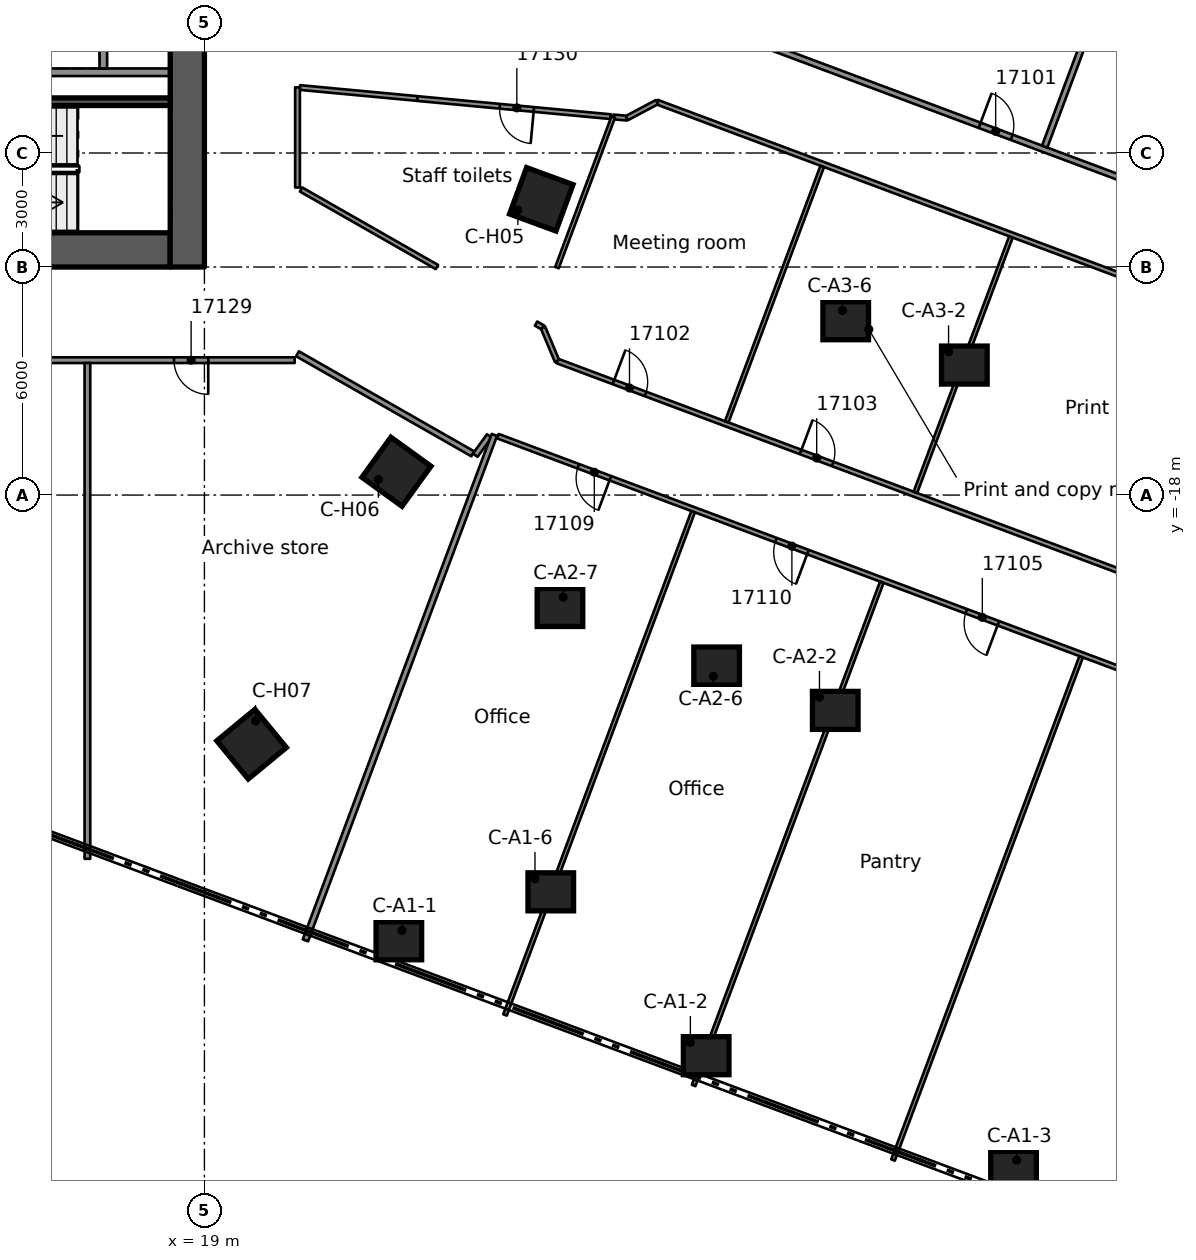
"""IFC4 building model, lengths in metres.
Left out: names, types, materials, properties, quantities, classifications, styles, units other than length and angle.
Written with IfcOpenShell. Run it as: python <this file> out.ifc"""

import sys

from ifc_helpers import new_model, si_unit, direction, frame, frame_2d, origin, origin_2d, place, context, subcontext, project, spatial, rectangle, extrude, element, fill, save


model = new_model("IFC4")
c1 = context("Model", 3, precision=1e-05, world=origin(), true_north=direction((0.0, 1.0)))
c2 = subcontext(c1, "Body", "Model", "MODEL_VIEW")
j1 = project(units=[si_unit("LENGTHUNIT", "METRE"), si_unit("PLANEANGLEUNIT", "RADIAN")], contexts=[c1])
p1 = place(None, origin())
s1 = spatial("IfcSite", under=j1, at=p1, CompositionType="ELEMENT")
p2 = place(p1, origin())
s2 = spatial("IfcBuilding", under=s1, at=p2, CompositionType="ELEMENT")
p3 = place(p2, frame((0.0, 0.0, 84.2)))
s3 = spatial("IfcBuildingStorey", under=s2, at=p3, CompositionType="ELEMENT", Elevation=84.2)
p4 = place(p3, frame((8.9, -11.55, 0.0), z_axis=(0.0, 0.0, 1.0), x_axis=(1.0, 0.0, 0.0)))
e1 = element("IfcWall", 1, at=p4, inside=s3, PredefinedType="SHEAR", context=c2, shape_type="SweptSolid", body=[
    extrude(rectangle(XDim=9.2, YDim=0.9, at=frame_2d((4.6, 0.0))), origin(), (0.0, 0.0, 1.0), 3.5),
])
p5 = place(p4, frame((3.0, 0.0, 0.0)))
e2 = element("IfcOpeningElement", 2, at=p5, cuts=e1, PredefinedType="OPENING", context=c2, shape_type="SweptSolid", body=[
    extrude(rectangle(XDim=1.1, YDim=2.1, at=frame_2d((0.55, 1.05))), frame((0.0, 0.46, 0.0), z_axis=(0.0, -1.0, 0.0), x_axis=(1.0, 0.0, 0.0)), (0.0, 0.0, 1.0), 0.92),
])
p6 = place(p3, frame((18.55, -12.0, 0.0), z_axis=(0.0, 0.0, 1.0), x_axis=(0.0, 1.0, 0.0)))
e3 = element("IfcWall", 3, at=p6, inside=s3, PredefinedType="SHEAR", context=c2, shape_type="SweptSolid", body=[
    extrude(rectangle(XDim=24.0, YDim=0.9, at=frame_2d((12.0, 0.0))), origin(), (0.0, 0.0, 1.0), 3.5),
])
p7 = place(p6, frame((12.1, 0.0, 0.0)))
e4 = element("IfcOpeningElement", 4, at=p7, cuts=e3, PredefinedType="OPENING", context=c2, shape_type="SweptSolid", body=[
    extrude(rectangle(XDim=1.8, YDim=2.1, at=frame_2d((0.9, 1.05))), frame((0.0, 0.46, 0.0), z_axis=(0.0, -1.0, 0.0), x_axis=(1.0, 0.0, 0.0)), (0.0, 0.0, 1.0), 0.92),
])
for number, where, z_axis, x_axis in (
    (5, (24.116, -29.728, 0.0), (0.0, 0.0, 1.0), (1.0, 0.0, 0.0)),
    (6, (32.203, -32.752, 0.0), (0.0, 0.0, 1.0), (1.0, 0.0, 0.0)),
    (7, (40.291, -35.771, 0.0), (0.0, 0.0, 1.0), (1.0, 0.0, 0.0)),
    (8, (28.114, -28.44, 0.0), (0.0, 0.0, 1.0), (1.0, 0.0, 0.0)),
    (9, (35.6, -23.666, 0.0), (0.0, 0.0, 1.0), (1.0, 0.0, 0.0)),
    (10, (32.478, -22.499, 0.0), (0.0, 0.0, 1.0), (1.0, 0.0, 0.0)),
    (11, (28.356, -20.958, 0.0), (0.0, 0.0, 1.0), (1.0, 0.0, 0.0)),
    (12, (38.997, -14.58, 0.0), (0.0, 0.0, 1.0), (1.0, 0.0, 0.0)),
    (13, (35.875, -13.413, 0.0), (0.0, 0.0, 1.0), (1.0, 0.0, 0.0)),
):
    element("IfcColumn", number, at=place(p3, frame(where, z_axis=z_axis, x_axis=x_axis)), inside=s3, PredefinedType="COLUMN", context=c2, shape_type="SweptSolid", body=[
        extrude(rectangle(XDim=1.2, YDim=1.0, at=origin_2d()), origin(), (0.0, 0.0, 1.0), 3.5),
    ])
for number, where, z_axis, x_axis in (
    (14, (27.864, -10.218, 0.0), (0.0, 0.0, 1.0), (0.939, -0.344, 0.0)),
    (15, (24.053, -17.387, 0.0), (0.0, 0.0, 1.0), (0.81, -0.586, 0.0)),
    (16, (20.241, -24.555, 0.0), (0.0, 0.0, 1.0), (0.636, -0.772, 0.0)),
):
    element("IfcColumn", number, at=place(p3, frame(where, z_axis=z_axis, x_axis=x_axis)), inside=s3, PredefinedType="COLUMN", context=c2, shape_type="SweptSolid", body=[
        extrude(rectangle(XDim=1.3, YDim=1.3, at=origin_2d()), origin(), (0.0, 0.0, 1.0), 3.5),
    ])
p8 = place(p3, frame((11.54, -6.875, 0.0), z_axis=(0.0, 0.0, 1.0), x_axis=(1.0, 0.0, 0.0)))
e17 = element("IfcWall", 17, at=p8, inside=s3, PredefinedType="SOLIDWALL", context=c2, shape_type="SweptSolid", body=[
    extrude(rectangle(XDim=6.56, YDim=0.2, at=frame_2d((3.28, 0.0))), origin(), (0.0, 0.0, 1.0), 3.09),
])
p9 = place(p3, frame((16.34, -4.025, 0.0), z_axis=(0.0, 0.0, 1.0), x_axis=(0.0, -1.0, 0.0)))
e18 = element("IfcWall", 18, at=p9, inside=s3, PredefinedType="SOLIDWALL", context=c2, shape_type="SweptSolid", body=[
    extrude(rectangle(XDim=2.75, YDim=0.2, at=frame_2d((1.375, 0.0))), origin(), (0.0, 0.0, 1.0), 3.09),
])
p10 = place(p9, frame((0.925, 0.0, 0.0)))
e19 = element("IfcOpeningElement", 19, at=p10, cuts=e18, PredefinedType="OPENING", context=c2, shape_type="SweptSolid", body=[
    extrude(rectangle(XDim=1.1, YDim=2.1, at=frame_2d((0.55, 1.05))), frame((0.0, 0.11, 0.0), z_axis=(0.0, -1.0, 0.0), x_axis=(1.0, 0.0, 0.0)), (0.0, 0.0, 1.0), 0.22),
])
p11 = place(p3, frame((11.54, -7.65, 0.0), z_axis=(0.0, 0.0, 1.0), x_axis=(1.0, 0.0, 0.0)))
e20 = element("IfcWall", 20, at=p11, inside=s3, PredefinedType="SOLIDWALL", context=c2, shape_type="SweptSolid", body=[
    extrude(rectangle(XDim=6.56, YDim=0.2, at=frame_2d((3.28, 0.0))), origin(), (0.0, 0.0, 1.0), 3.09),
])
p12 = place(p3, frame((21.45, -14.283, 0.0), z_axis=(0.0, 0.0, 1.0), x_axis=(0.868472254755, -0.495737776169, 0.0)))
e21 = element("IfcWall", 21, at=p12, inside=s3, PredefinedType="PARTITIONING", context=c2, shape_type="SweptSolid", body=[
    extrude(rectangle(XDim=5.309, YDim=0.15, at=frame_2d((2.655, 0.0))), origin(), (0.0, 0.0, 1.0), 3.08),
])
p13 = place(p3, frame((27.726, -13.488, 0.0), z_axis=(0.0, 0.0, 1.0), x_axis=(0.867243838512, -0.497883645608, 0.0)))
e22 = element("IfcWall", 22, at=p13, inside=s3, PredefinedType="PARTITIONING", context=c2, shape_type="SweptSolid", body=[
    extrude(rectangle(XDim=0.211, YDim=0.125, at=frame_2d((0.105, 0.0))), origin(), (0.0, 0.0, 1.0), 3.08),
])
p14 = place(p3, frame((21.543, -9.96, 0.0), z_axis=(0.0, 0.0, 1.0), x_axis=(0.868534999161, -0.495627839445, 0.0)))
e23 = element("IfcWall", 23, at=p14, inside=s3, PredefinedType="PARTITIONING", context=c2, shape_type="SweptSolid", body=[
    extrude(rectangle(XDim=4.116, YDim=0.125, at=frame_2d((2.058, 0.0))), origin(), (0.0, 0.0, 1.0), 3.08),
])
p15 = place(p3, frame((49.587, -24.999, 0.0), z_axis=(0.0, 0.0, 1.0), x_axis=(-0.936679277277, 0.350188422882, 0.0)))
e24 = element("IfcWall", 24, at=p15, inside=s3, PredefinedType="PARTITIONING", context=c2, shape_type="SweptSolid", body=[
    extrude(rectangle(XDim=24.413, YDim=0.125, at=frame_2d((12.207, 0.0))), origin(), (0.0, 0.0, 1.0), 3.08),
])
p16 = place(p15, frame((10.351, 0.0, 0.0)))
e25 = element("IfcOpeningElement", 25, at=p16, cuts=e24, PredefinedType="OPENING", context=c2, shape_type="SweptSolid", body=[
    extrude(rectangle(XDim=0.9, YDim=2.1, at=frame_2d((0.45, 1.05))), frame((0.0, 0.073, 0.0), z_axis=(0.0, -1.0, 0.0), x_axis=(1.0, 0.0, 0.0)), (0.0, 0.0, 1.0), 0.145),
])
p17 = place(p15, frame((4.752, 0.0, 0.0)))
e26 = element("IfcOpeningElement", 26, at=p17, cuts=e24, PredefinedType="OPENING", context=c2, shape_type="SweptSolid", body=[
    extrude(rectangle(XDim=0.9, YDim=2.1, at=frame_2d((0.45, 1.05))), frame((0.0, 0.073, 0.0), z_axis=(0.0, -1.0, 0.0), x_axis=(1.0, 0.0, 0.0)), (0.0, 0.0, 1.0), 0.145),
])
p18 = place(p15, frame((21.251, 0.0, 0.0)))
e27 = element("IfcOpeningElement", 27, at=p18, cuts=e24, PredefinedType="OPENING", context=c2, shape_type="SweptSolid", body=[
    extrude(rectangle(XDim=0.9, YDim=2.1, at=frame_2d((0.45, 1.05))), frame((0.0, 0.073, 0.0), z_axis=(0.0, -1.0, 0.0), x_axis=(1.0, 0.0, 0.0)), (0.0, 0.0, 1.0), 0.145),
])
p19 = place(p15, frame((15.701, 0.0, 0.0)))
e28 = element("IfcOpeningElement", 28, at=p19, cuts=e24, PredefinedType="OPENING", context=c2, shape_type="SweptSolid", body=[
    extrude(rectangle(XDim=0.9, YDim=2.1, at=frame_2d((0.45, 1.05))), frame((0.0, 0.073, 0.0), z_axis=(0.0, -1.0, 0.0), x_axis=(1.0, 0.0, 0.0)), (0.0, 0.0, 1.0), 0.145),
])
p20 = place(p3, frame((28.277, -14.469, 0.0), z_axis=(0.0, 0.0, 1.0), x_axis=(0.936688160915, -0.350164660128, 0.0)))
e29 = element("IfcWall", 29, at=p20, inside=s3, PredefinedType="PARTITIONING", context=c2, shape_type="SweptSolid", body=[
    extrude(rectangle(XDim=21.184, YDim=0.125, at=frame_2d((10.592, 0.0))), origin(), (0.0, 0.0, 1.0), 3.08),
])
p21 = place(p20, frame((1.587, 0.0, 0.0)))
e30 = element("IfcOpeningElement", 30, at=p21, cuts=e29, PredefinedType="OPENING", context=c2, shape_type="SweptSolid", body=[
    extrude(rectangle(XDim=0.9, YDim=2.1, at=frame_2d((0.45, 1.05))), frame((0.0, 0.073, 0.0), z_axis=(0.0, -1.0, 0.0), x_axis=(1.0, 0.0, 0.0)), (0.0, 0.0, 1.0), 0.145),
])
p22 = place(p20, frame((6.846, 0.0, 0.0)))
e31 = element("IfcOpeningElement", 31, at=p22, cuts=e29, PredefinedType="OPENING", context=c2, shape_type="SweptSolid", body=[
    extrude(rectangle(XDim=0.9, YDim=2.1, at=frame_2d((0.45, 1.05))), frame((0.0, 0.073, 0.0), z_axis=(0.0, -1.0, 0.0), x_axis=(1.0, 0.0, 0.0)), (0.0, 0.0, 1.0), 0.145),
])
p23 = place(p3, frame((50.675, -15.05, 0.0), z_axis=(0.0, 0.0, 1.0), x_axis=(-0.936673902411, 0.350202799165, 0.0)))
e32 = element("IfcWall", 32, at=p23, inside=s3, PredefinedType="PARTITIONING", context=c2, shape_type="SweptSolid", body=[
    extrude(rectangle(XDim=21.103, YDim=0.125, at=frame_2d((10.551, 0.0))), origin(), (0.0, 0.0, 1.0), 3.08),
])
p24 = place(p23, frame((5.037, 0.0, 0.0)))
e33 = element("IfcOpeningElement", 33, at=p24, cuts=e32, PredefinedType="OPENING", context=c2, shape_type="SweptSolid", body=[
    extrude(rectangle(XDim=0.9, YDim=2.1, at=frame_2d((0.45, 1.05))), frame((0.0, 0.073, 0.0), z_axis=(0.0, -1.0, 0.0), x_axis=(1.0, 0.0, 0.0)), (0.0, 0.0, 1.0), 0.145),
])
p25 = place(p3, frame((30.949, -5.112, 0.0), z_axis=(0.0, 0.0, 1.0), x_axis=(0.936693201773, -0.350151175568, 0.0)))
e34 = element("IfcWall", 34, at=p25, inside=s3, PredefinedType="PARTITIONING", context=c2, shape_type="SweptSolid", body=[
    extrude(rectangle(XDim=22.019, YDim=0.15, at=frame_2d((11.01, 0.0))), origin(), (0.0, 0.0, 1.0), 3.08),
])
p26 = place(p25, frame((2.265, 0.0, 0.0)))
e35 = element("IfcOpeningElement", 35, at=p26, cuts=e34, PredefinedType="OPENING", context=c2, shape_type="SweptSolid", body=[
    extrude(rectangle(XDim=0.9, YDim=2.1, at=frame_2d((0.45, 1.05))), frame((0.0, 0.085, 0.0), z_axis=(0.0, -1.0, 0.0), x_axis=(1.0, 0.0, 0.0)), (0.0, 0.0, 1.0), 0.17),
])
p27 = place(p25, frame((9.021, 0.0, 0.0)))
e36 = element("IfcOpeningElement", 36, at=p27, cuts=e34, PredefinedType="OPENING", context=c2, shape_type="SweptSolid", body=[
    extrude(rectangle(XDim=0.9, YDim=2.1, at=frame_2d((0.45, 1.05))), frame((0.0, 0.085, 0.0), z_axis=(0.0, -1.0, 0.0), x_axis=(1.0, 0.0, 0.0)), (0.0, 0.0, 1.0), 0.17),
])
p28 = place(p25, frame((13.171, 0.0, 0.0)))
e37 = element("IfcOpeningElement", 37, at=p28, cuts=e34, PredefinedType="OPENING", context=c2, shape_type="SweptSolid", body=[
    extrude(rectangle(XDim=0.9, YDim=2.1, at=frame_2d((0.45, 1.05))), frame((0.0, 0.085, 0.0), z_axis=(0.0, -1.0, 0.0), x_axis=(1.0, 0.0, 0.0)), (0.0, 0.0, 1.0), 0.17),
])
p29 = place(p25, frame((18.271, 0.0, 0.0)))
e38 = element("IfcOpeningElement", 38, at=p29, cuts=e34, PredefinedType="OPENING", context=c2, shape_type="SweptSolid", body=[
    extrude(rectangle(XDim=1.8, YDim=2.1, at=frame_2d((0.9, 1.05))), frame((0.0, 0.085, 0.0), z_axis=(0.0, -1.0, 0.0), x_axis=(1.0, 0.0, 0.0)), (0.0, 0.0, 1.0), 0.17),
])
p30 = place(p3, frame((29.691, -8.044, 0.0), z_axis=(0.0, 0.0, 1.0), x_axis=(-0.995633116016, 0.093352548402, 0.0)))
e39 = element("IfcWall", 39, at=p30, inside=s3, PredefinedType="PARTITIONING", context=c2, shape_type="SweptSolid", body=[
    extrude(rectangle(XDim=5.11, YDim=0.125, at=frame_2d((2.555, 0.0))), origin(), (0.0, 0.0, 1.0), 3.08),
])
p31 = place(p30, frame((2.031, 0.0, 0.0)))
e40 = element("IfcOpeningElement", 40, at=p31, cuts=e39, PredefinedType="OPENING", context=c2, shape_type="SweptSolid", body=[
    extrude(rectangle(XDim=0.9, YDim=2.1, at=frame_2d((0.45, 1.05))), frame((0.0, 0.073, 0.0), z_axis=(0.0, -1.0, 0.0), x_axis=(1.0, 0.0, 0.0)), (0.0, 0.0, 1.0), 0.145),
])
p32 = place(p3, frame((21.512, -7.277, 0.0), z_axis=(0.0, 0.0, 1.0), x_axis=(0.99566045899, -0.093060466381, 0.0)))
e41 = element("IfcWall", 41, at=p32, inside=s3, PredefinedType="PARTITIONING", context=c2, shape_type="SweptSolid", body=[
    extrude(rectangle(XDim=3.104, YDim=0.125, at=frame_2d((1.552, 0.0))), origin(), (0.0, 0.0, 1.0), 3.08),
])
p33 = place(p3, frame((29.759, -8.05, 0.0), z_axis=(0.0, 0.0, 1.0), x_axis=(0.995670146901, -0.092956756453, 0.0)))
e42 = element("IfcWall", 42, at=p33, inside=s3, PredefinedType="PARTITIONING", context=c2, shape_type="SweptSolid", body=[
    extrude(rectangle(XDim=0.354, YDim=0.125, at=frame_2d((0.177, 0.0))), origin(), (0.0, 0.0, 1.0), 3.08),
])
p34 = place(p3, frame((21.375, -14.451, 0.0), z_axis=(0.0, 0.0, 1.0), x_axis=(-1.0, 0.0, 0.0)))
e43 = element("IfcWall", 43, at=p34, inside=s3, PredefinedType="PARTITIONING", context=c2, shape_type="SweptSolid", body=[
    extrude(rectangle(XDim=10.984, YDim=0.15, at=frame_2d((5.492, 0.0))), origin(), (0.0, 0.0, 1.0), 3.08),
])
p35 = place(p34, frame((7.804, 0.0, 0.0)))
e44 = element("IfcOpeningElement", 44, at=p35, cuts=e43, PredefinedType="OPENING", context=c2, shape_type="SweptSolid", body=[
    extrude(rectangle(XDim=0.9, YDim=2.1, at=frame_2d((0.45, 1.05))), frame((0.0, 0.085, 0.0), z_axis=(0.0, -1.0, 0.0), x_axis=(1.0, 0.0, 0.0)), (0.0, 0.0, 1.0), 0.17),
])
p36 = place(p34, frame((2.275, 0.0, 0.0)))
e45 = element("IfcOpeningElement", 45, at=p36, cuts=e43, PredefinedType="OPENING", context=c2, shape_type="SweptSolid", body=[
    extrude(rectangle(XDim=0.9, YDim=2.1, at=frame_2d((0.45, 1.05))), frame((0.0, 0.085, 0.0), z_axis=(0.0, -1.0, 0.0), x_axis=(1.0, 0.0, 0.0)), (0.0, 0.0, 1.0), 0.17),
])
p37 = place(p3, frame((26.126, -16.952, 0.0), z_axis=(0.0, 0.0, 1.0), x_axis=(0.590016589342, 0.807391122258, 0.0)))
e46 = element("IfcWall", 46, at=p37, inside=s3, PredefinedType="PARTITIONING", context=c2, shape_type="SweptSolid", body=[
    extrude(rectangle(XDim=0.629, YDim=0.15, at=frame_2d((0.314, 0.0))), origin(), (0.0, 0.0, 1.0), 3.08),
])
p38 = place(p3, frame((28.277, -14.469, 0.0), z_axis=(0.0, 0.0, 1.0), x_axis=(-0.386952526605, 0.922099637867, 0.0)))
e47 = element("IfcWall", 47, at=p38, inside=s3, PredefinedType="PARTITIONING", context=c2, shape_type="SweptSolid", body=[
    extrude(rectangle(XDim=0.949, YDim=0.125, at=frame_2d((0.475, 0.0))), origin(), (0.0, 0.0, 1.0), 3.08),
])
p39 = place(p3, frame((37.12, -35.498, 0.0), z_axis=(0.0, 0.0, 1.0), x_axis=(0.350144786727, 0.936695590001, 0.0)))
e48 = element("IfcWall", 48, at=p39, inside=s3, PredefinedType="PARTITIONING", context=c2, shape_type="SweptSolid", body=[
    extrude(rectangle(XDim=14.137, YDim=0.1, at=frame_2d((7.068, 0.0))), origin(), (0.0, 0.0, 1.0), 3.08),
])
p40 = place(p3, frame((31.874, -33.536, 0.0), z_axis=(0.0, 0.0, 1.0), x_axis=(0.350228055147, 0.936664459338, 0.0)))
e49 = element("IfcWall", 49, at=p40, inside=s3, PredefinedType="PARTITIONING", context=c2, shape_type="SweptSolid", body=[
    extrude(rectangle(XDim=14.136, YDim=0.1, at=frame_2d((7.068, 0.0))), origin(), (0.0, 0.0, 1.0), 3.08),
])
p41 = place(p3, frame((37.709, -17.928, 0.0), z_axis=(0.0, 0.0, 1.0), x_axis=(0.350306504713, 0.93663512253, 0.0)))
e50 = element("IfcWall", 50, at=p41, inside=s3, PredefinedType="PARTITIONING", context=c2, shape_type="SweptSolid", body=[
    extrude(rectangle(XDim=7.174, YDim=0.1, at=frame_2d((3.587, 0.0))), origin(), (0.0, 0.0, 1.0), 3.08),
])
p42 = place(p3, frame((41.111, -8.831, 0.0), z_axis=(0.0, 0.0, 1.0), x_axis=(0.350164754545, 0.936688125618, 0.0)))
e51 = element("IfcWall", 51, at=p42, inside=s3, PredefinedType="PARTITIONING", context=c2, shape_type="SweptSolid", body=[
    extrude(rectangle(XDim=14.124, YDim=0.15, at=frame_2d((7.062, 0.0))), origin(), (0.0, 0.0, 1.0), 3.08),
])
p43 = place(p3, frame((26.91, -31.68, 0.0), z_axis=(0.0, 0.0, 1.0), x_axis=(0.350182597647, 0.936681455088, 0.0)))
e52 = element("IfcWall", 52, at=p43, inside=s3, PredefinedType="PARTITIONING", context=c2, shape_type="SweptSolid", body=[
    extrude(rectangle(XDim=14.136, YDim=0.1, at=frame_2d((7.068, 0.0))), origin(), (0.0, 0.0, 1.0), 3.08),
])
p44 = place(p3, frame((32.745, -16.072, 0.0), z_axis=(0.0, 0.0, 1.0), x_axis=(0.350187067912, 0.936679783847, 0.0)))
e53 = element("IfcWall", 53, at=p44, inside=s3, PredefinedType="PARTITIONING", context=c2, shape_type="SweptSolid", body=[
    extrude(rectangle(XDim=7.173, YDim=0.1, at=frame_2d((3.586, 0.0))), origin(), (0.0, 0.0, 1.0), 3.08),
])
p45 = place(p3, frame((21.658, -29.717, 0.0), z_axis=(0.0, 0.0, 1.0), x_axis=(0.350235805965, 0.936661561195, 0.0)))
e54 = element("IfcWall", 54, at=p45, inside=s3, PredefinedType="PARTITIONING", context=c2, shape_type="SweptSolid", body=[
    extrude(rectangle(XDim=14.199, YDim=0.15, at=frame_2d((7.1, 0.0))), origin(), (0.0, 0.0, 1.0), 3.08),
])
p46 = place(p3, frame((28.277, -12.015, 0.0), z_axis=(0.0, 0.0, 1.0), x_axis=(0.35011187795, 0.936707890924, 0.0)))
e55 = element("IfcWall", 55, at=p46, inside=s3, PredefinedType="PARTITIONING", context=c2, shape_type="SweptSolid", body=[
    extrude(rectangle(XDim=4.233, YDim=0.1, at=frame_2d((2.116, 0.0))), origin(), (0.0, 0.0, 1.0), 3.08),
])
p47 = place(p3, frame((30.113, -8.083, 0.0), z_axis=(0.0, 0.0, 1.0), x_axis=(0.882989439454, 0.469392852323, 0.0)))
e56 = element("IfcWall", 56, at=p47, inside=s3, PredefinedType="PARTITIONING", context=c2, shape_type="SweptSolid", body=[
    extrude(rectangle(XDim=0.901, YDim=0.125, at=frame_2d((0.451, 0.0))), origin(), (0.0, 0.0, 1.0), 3.08),
])
p48 = place(p3, frame((21.45, -9.907, 0.0), z_axis=(0.0, 0.0, 1.0), x_axis=(0.0, 1.0, 0.0)))
e57 = element("IfcWall", 57, at=p48, inside=s3, PredefinedType="PARTITIONING", context=c2, shape_type="SweptSolid", body=[
    extrude(rectangle(XDim=2.636, YDim=0.125, at=frame_2d((1.318, 0.0))), origin(), (0.0, 0.0, 1.0), 3.08),
])
p49 = place(p3, frame((15.921, -27.572, 0.0), z_axis=(0.0, 0.0, 1.0), x_axis=(0.0, 1.0, 0.0)))
e58 = element("IfcWall", 58, at=p49, inside=s3, PredefinedType="PARTITIONING", context=c2, shape_type="SweptSolid", body=[
    extrude(rectangle(XDim=13.046, YDim=0.15, at=frame_2d((6.523, 0.0))), origin(), (0.0, 0.0, 1.0), 3.08),
])
p50 = place(p27, origin())
e59 = element("IfcDoor", 59, at=p50, inside=s3, OperationType="SINGLE_SWING_LEFT", PredefinedType="DOOR", context=c2, shape_type="SweptSolid", body=[
    extrude(rectangle(XDim=0.9, YDim=2.1, at=frame_2d((0.45, 1.05))), frame((0.0, 0.025, 0.0), z_axis=(0.0, -1.0, 0.0), x_axis=(1.0, 0.0, 0.0)), (0.0, 0.0, 1.0), 0.05),
])
fill(e36, e59)
p51 = place(p21, origin())
e60 = element("IfcDoor", 60, at=p51, inside=s3, OperationType="SINGLE_SWING_LEFT", PredefinedType="DOOR", context=c2, shape_type="SweptSolid", body=[
    extrude(rectangle(XDim=0.9, YDim=2.1, at=frame_2d((0.45, 1.05))), frame((0.0, 0.025, 0.0), z_axis=(0.0, -1.0, 0.0), x_axis=(1.0, 0.0, 0.0)), (0.0, 0.0, 1.0), 0.05),
])
fill(e30, e60)
p52 = place(p22, origin())
e61 = element("IfcDoor", 61, at=p52, inside=s3, OperationType="SINGLE_SWING_LEFT", PredefinedType="DOOR", context=c2, shape_type="SweptSolid", body=[
    extrude(rectangle(XDim=0.9, YDim=2.1, at=frame_2d((0.45, 1.05))), frame((0.0, 0.025, 0.0), z_axis=(0.0, -1.0, 0.0), x_axis=(1.0, 0.0, 0.0)), (0.0, 0.0, 1.0), 0.05),
])
fill(e31, e61)
p53 = place(p16, origin())
e62 = element("IfcDoor", 62, at=p53, inside=s3, OperationType="SINGLE_SWING_LEFT", PredefinedType="DOOR", context=c2, shape_type="SweptSolid", body=[
    extrude(rectangle(XDim=0.9, YDim=2.1, at=frame_2d((0.45, 1.05))), frame((0.0, 0.025, 0.0), z_axis=(0.0, -1.0, 0.0), x_axis=(1.0, 0.0, 0.0)), (0.0, 0.0, 1.0), 0.05),
])
fill(e25, e62)
p54 = place(p18, origin())
e63 = element("IfcDoor", 63, at=p54, inside=s3, OperationType="SINGLE_SWING_RIGHT", PredefinedType="DOOR", context=c2, shape_type="SweptSolid", body=[
    extrude(rectangle(XDim=0.9, YDim=2.1, at=frame_2d((0.45, 1.05))), frame((0.0, 0.025, 0.0), z_axis=(0.0, -1.0, 0.0), x_axis=(1.0, 0.0, 0.0)), (0.0, 0.0, 1.0), 0.05),
])
fill(e27, e63)
p55 = place(p19, origin())
e64 = element("IfcDoor", 64, at=p55, inside=s3, OperationType="SINGLE_SWING_RIGHT", PredefinedType="DOOR", context=c2, shape_type="SweptSolid", body=[
    extrude(rectangle(XDim=0.9, YDim=2.1, at=frame_2d((0.45, 1.05))), frame((0.0, 0.025, 0.0), z_axis=(0.0, -1.0, 0.0), x_axis=(1.0, 0.0, 0.0)), (0.0, 0.0, 1.0), 0.05),
])
fill(e28, e64)
p56 = place(p36, origin())
e65 = element("IfcDoor", 65, at=p56, inside=s3, OperationType="SINGLE_SWING_LEFT", PredefinedType="DOOR", context=c2, shape_type="SweptSolid", body=[
    extrude(rectangle(XDim=0.9, YDim=2.1, at=frame_2d((0.45, 1.05))), frame((0.0, 0.025, 0.0), z_axis=(0.0, -1.0, 0.0), x_axis=(1.0, 0.0, 0.0)), (0.0, 0.0, 1.0), 0.05),
])
fill(e45, e65)
p57 = place(p31, origin())
e66 = element("IfcDoor", 66, at=p57, inside=s3, OperationType="SINGLE_SWING_LEFT", PredefinedType="DOOR", context=c2, shape_type="SweptSolid", body=[
    extrude(rectangle(XDim=0.9, YDim=2.1, at=frame_2d((0.45, 1.05))), frame((0.0, 0.025, 0.0), z_axis=(0.0, -1.0, 0.0), x_axis=(1.0, 0.0, 0.0)), (0.0, 0.0, 1.0), 0.05),
])
fill(e40, e66)
save(model, sys.argv[1])
